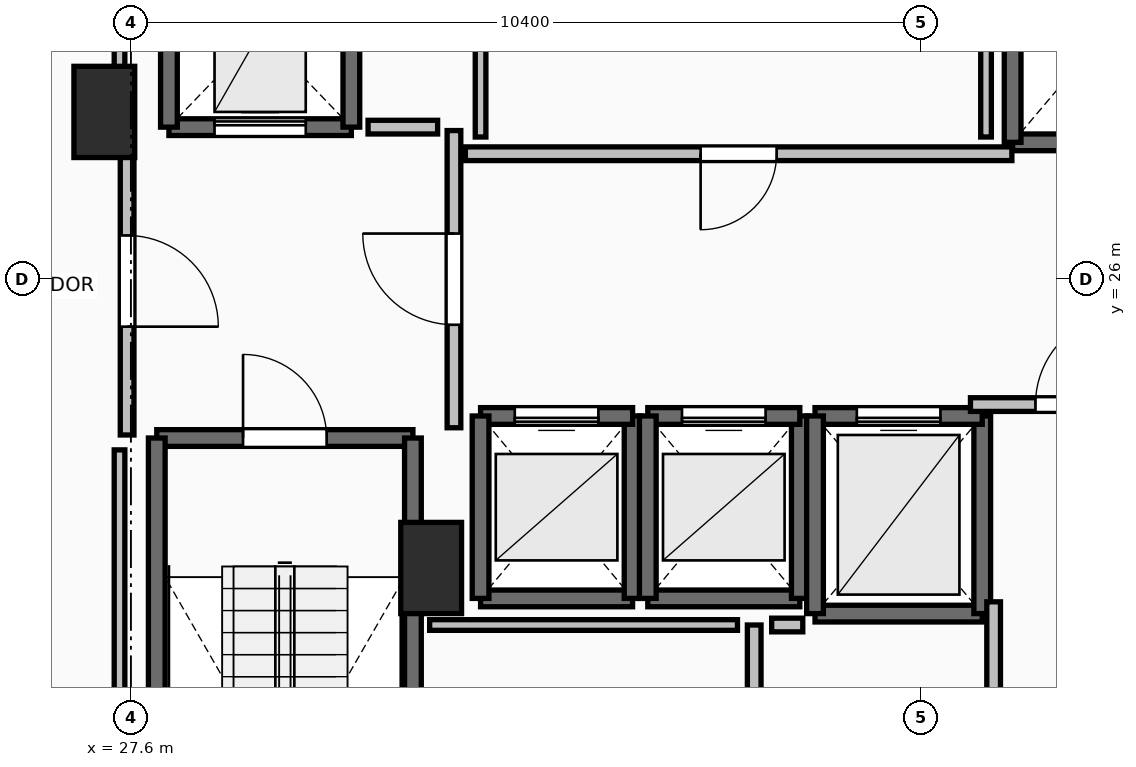
"""IFC4 building model, lengths in metres.
Left out: names, types, materials, properties, quantities, classifications, styles, units other than length and angle.
Written with IfcOpenShell. Run it as: python <this file> out.ifc"""

import sys

from ifc_helpers import new_model, si_unit, direction, frame, frame_2d, origin, origin_2d, place, context, subcontext, project, spatial, rectangle, extrude, element, fill, save


model = new_model("IFC4")
c1 = context("Model", 3, precision=1e-05, world=origin(), true_north=direction((0.0, 1.0)))
c2 = subcontext(c1, "Body", "Model", "MODEL_VIEW")
j1 = project(units=[si_unit("LENGTHUNIT", "METRE"), si_unit("PLANEANGLEUNIT", "RADIAN")], contexts=[c1])
p1 = place(None, origin())
s1 = spatial("IfcSite", under=j1, at=p1, CompositionType="ELEMENT")
p2 = place(p1, origin())
s2 = spatial("IfcBuilding", under=s1, at=p2, CompositionType="ELEMENT")
p3 = place(p2, frame((0.0, 0.0, 139.6)))
s3 = spatial("IfcBuildingStorey", under=s2, at=p3, CompositionType="ELEMENT", Elevation=139.6)
for number, where, z_axis, x_axis in (
    (1, (27.25, 28.2, 0.0), (0.0, 0.0, 1.0), (1.0, 0.0, 0.0)),
    (2, (31.55, 22.2, 0.0), (0.0, 0.0, 1.0), (1.0, 0.0, 0.0)),
):
    element("IfcColumn", number, at=place(p3, frame(where, z_axis=z_axis, x_axis=x_axis)), inside=s3, PredefinedType="PILASTER", context=c2, shape_type="SweptSolid", body=[
        extrude(rectangle(XDim=0.8, YDim=1.2, at=origin_2d()), origin(), (0.0, 0.0, 1.0), 3.5),
    ])
p4 = place(p3, frame((27.94, 23.91, 0.0), z_axis=(0.0, 0.0, 1.0), x_axis=(1.0, 0.0, 0.0)))
e3 = element("IfcWall", 3, at=p4, inside=s3, PredefinedType="SOLIDWALL", context=c2, shape_type="SweptSolid", body=[
    extrude(rectangle(XDim=3.37, YDim=0.22, at=frame_2d((1.685, 0.0))), origin(), (0.0, 0.0, 1.0), 3.24),
])
p5 = place(p4, frame((1.135, 0.0, 0.0)))
e4 = element("IfcOpeningElement", 4, at=p5, cuts=e3, PredefinedType="OPENING", context=c2, shape_type="SweptSolid", body=[
    extrude(rectangle(XDim=1.1, YDim=2.15, at=frame_2d((0.55, 1.075))), frame((0.0, 0.125, 0.0), z_axis=(0.0, -1.0, 0.0), x_axis=(1.0, 0.0, 0.0)), (0.0, 0.0, 1.0), 0.25),
])
for number, where, z_axis, x_axis in (
    (5, (31.31, 23.91, 0.0), (0.0, 0.0, 1.0), (0.0, -1.0, 0.0)),
    (6, (27.94, 16.49, 0.0), (0.0, 0.0, 1.0), (0.0, 1.0, 0.0)),
):
    element("IfcWall", number, at=place(p3, frame(where, z_axis=z_axis, x_axis=x_axis)), inside=s3, PredefinedType="SOLIDWALL", context=c2, shape_type="SweptSolid", body=[
        extrude(rectangle(XDim=7.42, YDim=0.22, at=frame_2d((3.71, 0.0))), origin(), (0.0, 0.0, 1.0), 3.24),
    ])
p6 = place(p3, frame((32.2, 21.8, 0.0), z_axis=(0.0, 0.0, 1.0), x_axis=(1.0, 0.0, 0.0)))
e7 = element("IfcWall", 7, at=p6, inside=s3, PredefinedType="SOLIDWALL", context=c2, shape_type="SweptSolid", body=[
    extrude(rectangle(XDim=2.0, YDim=0.22, at=frame_2d((1.0, 0.0))), origin(), (0.0, 0.0, 1.0), 3.24),
])
p7 = place(p3, frame((34.2, 21.8, 0.0), z_axis=(0.0, 0.0, 1.0), x_axis=(0.0, 1.0, 0.0)))
e8 = element("IfcWall", 8, at=p7, inside=s3, PredefinedType="SOLIDWALL", context=c2, shape_type="SweptSolid", body=[
    extrude(rectangle(XDim=2.4, YDim=0.22, at=frame_2d((1.2, 0.0))), origin(), (0.0, 0.0, 1.0), 3.24),
])
p8 = place(p3, frame((34.2, 24.2, 0.0), z_axis=(0.0, 0.0, 1.0), x_axis=(-1.0, 0.0, 0.0)))
e9 = element("IfcWall", 9, at=p8, inside=s3, PredefinedType="SOLIDWALL", context=c2, shape_type="SweptSolid", body=[
    extrude(rectangle(XDim=2.0, YDim=0.22, at=frame_2d((1.0, 0.0))), origin(), (0.0, 0.0, 1.0), 3.24),
])
p9 = place(p8, frame((0.45, 0.0, 0.0)))
e10 = element("IfcOpeningElement", 10, at=p9, cuts=e9, PredefinedType="OPENING", context=c2, shape_type="SweptSolid", body=[
    extrude(rectangle(XDim=1.1, YDim=2.2, at=frame_2d((0.55, 1.1))), frame((0.0, 0.125, 0.0), z_axis=(0.0, -1.0, 0.0), x_axis=(1.0, 0.0, 0.0)), (0.0, 0.0, 1.0), 0.25),
])
p10 = place(p3, frame((32.2, 24.2, 0.0), z_axis=(0.0, 0.0, 1.0), x_axis=(0.0, -1.0, 0.0)))
e11 = element("IfcWall", 11, at=p10, inside=s3, PredefinedType="SOLIDWALL", context=c2, shape_type="SweptSolid", body=[
    extrude(rectangle(XDim=2.4, YDim=0.22, at=frame_2d((1.2, 0.0))), origin(), (0.0, 0.0, 1.0), 3.24),
])
p11 = place(p3, frame((34.4, 21.8, 0.0), z_axis=(0.0, 0.0, 1.0), x_axis=(1.0, 0.0, 0.0)))
e12 = element("IfcWall", 12, at=p11, inside=s3, PredefinedType="SOLIDWALL", context=c2, shape_type="SweptSolid", body=[
    extrude(rectangle(XDim=2.0, YDim=0.22, at=frame_2d((1.0, 0.0))), origin(), (0.0, 0.0, 1.0), 3.24),
])
p12 = place(p3, frame((36.4, 21.8, 0.0), z_axis=(0.0, 0.0, 1.0), x_axis=(0.0, 1.0, 0.0)))
e13 = element("IfcWall", 13, at=p12, inside=s3, PredefinedType="SOLIDWALL", context=c2, shape_type="SweptSolid", body=[
    extrude(rectangle(XDim=2.4, YDim=0.22, at=frame_2d((1.2, 0.0))), origin(), (0.0, 0.0, 1.0), 3.24),
])
p13 = place(p3, frame((36.4, 24.2, 0.0), z_axis=(0.0, 0.0, 1.0), x_axis=(-1.0, 0.0, 0.0)))
e14 = element("IfcWall", 14, at=p13, inside=s3, PredefinedType="SOLIDWALL", context=c2, shape_type="SweptSolid", body=[
    extrude(rectangle(XDim=2.0, YDim=0.22, at=frame_2d((1.0, 0.0))), origin(), (0.0, 0.0, 1.0), 3.24),
])
p14 = place(p13, frame((0.45, 0.0, 0.0)))
e15 = element("IfcOpeningElement", 15, at=p14, cuts=e14, PredefinedType="OPENING", context=c2, shape_type="SweptSolid", body=[
    extrude(rectangle(XDim=1.1, YDim=2.2, at=frame_2d((0.55, 1.1))), frame((0.0, 0.125, 0.0), z_axis=(0.0, -1.0, 0.0), x_axis=(1.0, 0.0, 0.0)), (0.0, 0.0, 1.0), 0.25),
])
p15 = place(p3, frame((34.4, 24.2, 0.0), z_axis=(0.0, 0.0, 1.0), x_axis=(0.0, -1.0, 0.0)))
e16 = element("IfcWall", 16, at=p15, inside=s3, PredefinedType="SOLIDWALL", context=c2, shape_type="SweptSolid", body=[
    extrude(rectangle(XDim=2.4, YDim=0.22, at=frame_2d((1.2, 0.0))), origin(), (0.0, 0.0, 1.0), 3.24),
])
p16 = place(p3, frame((36.6, 21.6, 0.0), z_axis=(0.0, 0.0, 1.0), x_axis=(1.0, 0.0, 0.0)))
e17 = element("IfcWall", 17, at=p16, inside=s3, PredefinedType="SOLIDWALL", context=c2, shape_type="SweptSolid", body=[
    extrude(rectangle(XDim=2.2, YDim=0.22, at=frame_2d((1.1, 0.0))), origin(), (0.0, 0.0, 1.0), 3.24),
])
p17 = place(p3, frame((38.8, 21.6, 0.0), z_axis=(0.0, 0.0, 1.0), x_axis=(0.0, 1.0, 0.0)))
e18 = element("IfcWall", 18, at=p17, inside=s3, PredefinedType="SOLIDWALL", context=c2, shape_type="SweptSolid", body=[
    extrude(rectangle(XDim=2.6, YDim=0.22, at=frame_2d((1.3, 0.0))), origin(), (0.0, 0.0, 1.0), 3.24),
])
p18 = place(p3, frame((38.8, 24.2, 0.0), z_axis=(0.0, 0.0, 1.0), x_axis=(-1.0, 0.0, 0.0)))
e19 = element("IfcWall", 19, at=p18, inside=s3, PredefinedType="SOLIDWALL", context=c2, shape_type="SweptSolid", body=[
    extrude(rectangle(XDim=2.2, YDim=0.22, at=frame_2d((1.1, 0.0))), origin(), (0.0, 0.0, 1.0), 3.24),
])
p19 = place(p18, frame((0.55, 0.0, 0.0)))
e20 = element("IfcOpeningElement", 20, at=p19, cuts=e19, PredefinedType="OPENING", context=c2, shape_type="SweptSolid", body=[
    extrude(rectangle(XDim=1.1, YDim=2.2, at=frame_2d((0.55, 1.1))), frame((0.0, 0.125, 0.0), z_axis=(0.0, -1.0, 0.0), x_axis=(1.0, 0.0, 0.0)), (0.0, 0.0, 1.0), 0.25),
])
p20 = place(p3, frame((36.6, 24.2, 0.0), z_axis=(0.0, 0.0, 1.0), x_axis=(0.0, -1.0, 0.0)))
e21 = element("IfcWall", 21, at=p20, inside=s3, PredefinedType="SOLIDWALL", context=c2, shape_type="SweptSolid", body=[
    extrude(rectangle(XDim=2.6, YDim=0.22, at=frame_2d((1.3, 0.0))), origin(), (0.0, 0.0, 1.0), 3.24),
])
p21 = place(p3, frame((39.2, 27.8, 0.0), z_axis=(0.0, 0.0, 1.0), x_axis=(1.0, 0.0, 0.0)))
e22 = element("IfcWall", 22, at=p21, inside=s3, PredefinedType="SOLIDWALL", context=c2, shape_type="SweptSolid", body=[
    extrude(rectangle(XDim=2.2, YDim=0.22, at=frame_2d((1.1, 0.0))), origin(), (0.0, 0.0, 1.0), 3.24),
])
p22 = place(p3, frame((39.2, 30.4, 0.0), z_axis=(0.0, 0.0, 1.0), x_axis=(0.0, -1.0, 0.0)))
e23 = element("IfcWall", 23, at=p22, inside=s3, PredefinedType="SOLIDWALL", context=c2, shape_type="SweptSolid", body=[
    extrude(rectangle(XDim=2.6, YDim=0.22, at=frame_2d((1.3, 0.0))), origin(), (0.0, 0.0, 1.0), 3.24),
])
p23 = place(p3, frame((28.1, 28.0, 0.0), z_axis=(0.0, 0.0, 1.0), x_axis=(1.0, 0.0, 0.0)))
e24 = element("IfcWall", 24, at=p23, inside=s3, PredefinedType="SHEAR", context=c2, shape_type="SweptSolid", body=[
    extrude(rectangle(XDim=2.4, YDim=0.22, at=frame_2d((1.2, 0.0))), origin(), (0.0, 0.0, 1.0), 3.24),
])
p24 = place(p23, frame((0.6, 0.0, 0.0)))
e25 = element("IfcOpeningElement", 25, at=p24, cuts=e24, PredefinedType="OPENING", context=c2, shape_type="SweptSolid", body=[
    extrude(rectangle(XDim=1.2, YDim=2.2, at=frame_2d((0.6, 1.1))), frame((0.0, 0.125, 0.0), z_axis=(0.0, -1.0, 0.0), x_axis=(1.0, 0.0, 0.0)), (0.0, 0.0, 1.0), 0.25),
])
for number, where, z_axis, x_axis in (
    (26, (30.5, 28.0, 0.0), (0.0, 0.0, 1.0), (0.0, 1.0, 0.0)),
    (27, (28.1, 30.5, 0.0), (0.0, 0.0, 1.0), (0.0, -1.0, 0.0)),
):
    element("IfcWall", number, at=place(p3, frame(where, z_axis=z_axis, x_axis=x_axis)), inside=s3, PredefinedType="SHEAR", context=c2, shape_type="SweptSolid", body=[
        extrude(rectangle(XDim=2.5, YDim=0.22, at=frame_2d((1.25, 0.0))), origin(), (0.0, 0.0, 1.0), 3.24),
    ])
p25 = place(p3, frame((31.85, 24.045, 0.0), z_axis=(0.0, 0.0, 1.0), x_axis=(0.0, 1.0, 0.0)))
e28 = element("IfcWall", 28, at=p25, inside=s3, PredefinedType="PARTITIONING", context=c2, shape_type="SweptSolid", body=[
    extrude(rectangle(XDim=3.91, YDim=0.18, at=frame_2d((1.955, 0.0))), origin(), (0.0, 0.0, 1.0), 3.24),
])
p26 = place(p25, frame((1.355, 0.0, 0.0)))
e29 = element("IfcOpeningElement", 29, at=p26, cuts=e28, PredefinedType="OPENING", context=c2, shape_type="SweptSolid", body=[
    extrude(rectangle(XDim=1.2, YDim=2.15, at=frame_2d((0.6, 1.075))), frame((0.0, 0.105, 0.0), z_axis=(0.0, -1.0, 0.0), x_axis=(1.0, 0.0, 0.0)), (0.0, 0.0, 1.0), 0.21),
])
p27 = place(p3, frame((27.55, 28.0, 0.0), z_axis=(0.0, 0.0, 1.0), x_axis=(0.0, -1.0, 0.0)))
e30 = element("IfcWall", 30, at=p27, inside=s3, PredefinedType="PARTITIONING", context=c2, shape_type="SweptSolid", body=[
    extrude(rectangle(XDim=4.05, YDim=0.18, at=frame_2d((2.025, 0.0))), origin(), (0.0, 0.0, 1.0), 3.24),
])
p28 = place(p27, frame((1.425, 0.0, 0.0)))
e31 = element("IfcOpeningElement", 31, at=p28, cuts=e30, PredefinedType="OPENING", context=c2, shape_type="SweptSolid", body=[
    extrude(rectangle(XDim=1.2, YDim=2.15, at=frame_2d((0.6, 1.075))), frame((0.0, 0.105, 0.0), z_axis=(0.0, -1.0, 0.0), x_axis=(1.0, 0.0, 0.0)), (0.0, 0.0, 1.0), 0.21),
])
p29 = place(p3, frame((38.645, 24.35, 0.0), z_axis=(0.0, 0.0, 1.0), x_axis=(1.0, 0.0, 0.0)))
e32 = element("IfcWall", 32, at=p29, inside=s3, PredefinedType="PARTITIONING", context=c2, shape_type="SweptSolid", body=[
    extrude(rectangle(XDim=2.91, YDim=0.18, at=frame_2d((1.455, 0.0))), origin(), (0.0, 0.0, 1.0), 3.24),
])
p30 = place(p29, frame((0.855, 0.0, 0.0)))
e33 = element("IfcOpeningElement", 33, at=p30, cuts=e32, PredefinedType="OPENING", context=c2, shape_type="SweptSolid", body=[
    extrude(rectangle(XDim=1.2, YDim=2.15, at=frame_2d((0.6, 1.075))), frame((0.0, 0.105, 0.0), z_axis=(0.0, -1.0, 0.0), x_axis=(1.0, 0.0, 0.0)), (0.0, 0.0, 1.0), 0.21),
])
p31 = place(p3, frame((39.19, 27.65, 0.0), z_axis=(0.0, 0.0, 1.0), x_axis=(-1.0, 0.0, 0.0)))
e34 = element("IfcWall", 34, at=p31, inside=s3, PredefinedType="PARTITIONING", context=c2, shape_type="SweptSolid", body=[
    extrude(rectangle(XDim=7.19, YDim=0.18, at=frame_2d((3.595, 0.0))), origin(), (0.0, 0.0, 1.0), 3.24),
])
p32 = place(p31, frame((3.095, 0.0, 0.0)))
e35 = element("IfcOpeningElement", 35, at=p32, cuts=e34, PredefinedType="OPENING", context=c2, shape_type="SweptSolid", body=[
    extrude(rectangle(XDim=1.0, YDim=2.15, at=frame_2d((0.5, 1.075))), frame((0.0, 0.105, 0.0), z_axis=(0.0, -1.0, 0.0), x_axis=(1.0, 0.0, 0.0)), (0.0, 0.0, 1.0), 0.21),
])
p33 = place(p3, frame((38.95, 21.755, 0.0), z_axis=(0.0, 0.0, 1.0), x_axis=(0.0, -1.0, 0.0)))
e36 = element("IfcWall", 36, at=p33, inside=s3, PredefinedType="PARTITIONING", context=c2, shape_type="SweptSolid", body=[
    extrude(rectangle(XDim=5.435, YDim=0.18, at=frame_2d((2.717, 0.0))), origin(), (0.0, 0.0, 1.0), 3.24),
])
p34 = place(p33, frame((2.018, 0.0, 0.0)))
e37 = element("IfcOpeningElement", 37, at=p34, cuts=e36, PredefinedType="OPENING", context=c2, shape_type="SweptSolid", body=[
    extrude(rectangle(XDim=1.4, YDim=2.2, at=frame_2d((0.7, 1.1))), frame((0.0, 0.105, 0.0), z_axis=(0.0, -1.0, 0.0), x_axis=(1.0, 0.0, 0.0)), (0.0, 0.0, 1.0), 0.21),
])
p35 = place(p3, frame((35.8, 16.32, 0.0), z_axis=(0.0, 0.0, 1.0), x_axis=(0.0, 1.0, 0.0)))
e38 = element("IfcWall", 38, at=p35, inside=s3, PredefinedType="PARTITIONING", context=c2, shape_type="SweptSolid", body=[
    extrude(rectangle(XDim=5.13, YDim=0.18, at=frame_2d((2.565, 0.0))), origin(), (0.0, 0.0, 1.0), 3.24),
])
p36 = place(p3, frame((31.635, 28.0, 0.0), z_axis=(0.0, 0.0, 1.0), x_axis=(-1.0, 0.0, 0.0)))
e39 = element("IfcWall", 39, at=p36, inside=s3, PredefinedType="PARTITIONING", context=c2, shape_type="SweptSolid", body=[
    extrude(rectangle(XDim=0.915, YDim=0.18, at=frame_2d((0.458, 0.0))), origin(), (0.0, 0.0, 1.0), 3.24),
])
p37 = place(p3, frame((35.58, 21.45, 0.0), z_axis=(0.0, 0.0, 1.0), x_axis=(-1.0, 0.0, 0.0)))
e40 = element("IfcWall", 40, at=p37, inside=s3, PredefinedType="PARTITIONING", context=c2, shape_type="SweptSolid", body=[
    extrude(rectangle(XDim=4.05, YDim=0.14, at=frame_2d((2.025, 0.0))), origin(), (0.0, 0.0, 1.0), 3.24),
])
p38 = place(p3, frame((36.439, 21.45, 0.0), z_axis=(0.0, 0.0, 1.0), x_axis=(-1.0, 0.0, 0.0)))
e41 = element("IfcWall", 41, at=p38, inside=s3, PredefinedType="PARTITIONING", context=c2, shape_type="SweptSolid", body=[
    extrude(rectangle(XDim=0.409, YDim=0.18, at=frame_2d((0.205, 0.0))), origin(), (0.0, 0.0, 1.0), 3.24),
])
for number, where, z_axis, x_axis in (
    (42, (32.2, 30.26, 0.0), (0.0, 0.0, 1.0), (0.0, -1.0, 0.0)),
    (43, (38.85, 27.87, 0.0), (0.0, 0.0, 1.0), (0.0, 1.0, 0.0)),
):
    element("IfcWall", number, at=place(p3, frame(where, z_axis=z_axis, x_axis=x_axis)), inside=s3, PredefinedType="PARTITIONING", context=c2, shape_type="SweptSolid", body=[
        extrude(rectangle(XDim=2.39, YDim=0.14, at=frame_2d((1.195, 0.0))), origin(), (0.0, 0.0, 1.0), 3.24),
    ])
p39 = place(p3, frame((27.45, 33.45, 0.0), z_axis=(0.0, 0.0, 1.0), x_axis=(0.0, -1.0, 0.0)))
e44 = element("IfcWall", 44, at=p39, inside=s3, PredefinedType="PARTITIONING", context=c2, shape_type="SweptSolid", body=[
    extrude(rectangle(XDim=5.254, YDim=0.14, at=frame_2d((2.627, 0.0))), origin(), (0.0, 0.0, 1.0), 2.432),
])
p40 = place(p3, frame((27.45, 23.754, 0.0), z_axis=(0.0, 0.0, 1.0), x_axis=(0.0, -1.0, 0.0)))
e45 = element("IfcWall", 45, at=p40, inside=s3, PredefinedType="PARTITIONING", context=c2, shape_type="SweptSolid", body=[
    extrude(rectangle(XDim=7.514, YDim=0.14, at=frame_2d((3.757, 0.0))), origin(), (0.0, 0.0, 1.0), 2.432),
])
p41 = place(p5, origin())
e46 = element("IfcDoor", 46, at=p41, inside=s3, OperationType="SINGLE_SWING_LEFT", PredefinedType="DOOR", context=c2, shape_type="SweptSolid", body=[
    extrude(rectangle(XDim=1.1, YDim=2.15, at=frame_2d((0.55, 1.075))), frame((0.0, 0.025, 0.0), z_axis=(0.0, -1.0, 0.0), x_axis=(1.0, 0.0, 0.0)), (0.0, 0.0, 1.0), 0.05),
])
fill(e4, e46)
p42 = place(p9, origin())
e47 = element("IfcDoor", 47, at=p42, inside=s3, OperationType="SLIDING_TO_LEFT", PredefinedType="DOOR", context=c2, shape_type="SweptSolid", body=[
    extrude(rectangle(XDim=1.1, YDim=2.2, at=frame_2d((0.55, 1.1))), frame((0.0, 0.025, 0.0), z_axis=(0.0, -1.0, 0.0), x_axis=(1.0, 0.0, 0.0)), (0.0, 0.0, 1.0), 0.05),
])
fill(e10, e47)
p43 = place(p14, origin())
e48 = element("IfcDoor", 48, at=p43, inside=s3, OperationType="SLIDING_TO_LEFT", PredefinedType="DOOR", context=c2, shape_type="SweptSolid", body=[
    extrude(rectangle(XDim=1.1, YDim=2.2, at=frame_2d((0.55, 1.1))), frame((0.0, 0.025, 0.0), z_axis=(0.0, -1.0, 0.0), x_axis=(1.0, 0.0, 0.0)), (0.0, 0.0, 1.0), 0.05),
])
fill(e15, e48)
p44 = place(p19, origin())
e49 = element("IfcDoor", 49, at=p44, inside=s3, OperationType="SLIDING_TO_LEFT", PredefinedType="DOOR", context=c2, shape_type="SweptSolid", body=[
    extrude(rectangle(XDim=1.1, YDim=2.2, at=frame_2d((0.55, 1.1))), frame((0.0, 0.025, 0.0), z_axis=(0.0, -1.0, 0.0), x_axis=(1.0, 0.0, 0.0)), (0.0, 0.0, 1.0), 0.05),
])
fill(e20, e49)
p45 = place(p24, origin())
e50 = element("IfcDoor", 50, at=p45, inside=s3, OperationType="SLIDING_TO_LEFT", PredefinedType="DOOR", context=c2, shape_type="SweptSolid", body=[
    extrude(rectangle(XDim=1.2, YDim=2.2, at=frame_2d((0.6, 1.1))), frame((0.0, 0.025, 0.0), z_axis=(0.0, -1.0, 0.0), x_axis=(1.0, 0.0, 0.0)), (0.0, 0.0, 1.0), 0.05),
])
fill(e25, e50)
p46 = place(p26, origin())
e51 = element("IfcDoor", 51, at=p46, inside=s3, OperationType="SINGLE_SWING_RIGHT", PredefinedType="DOOR", context=c2, shape_type="SweptSolid", body=[
    extrude(rectangle(XDim=1.2, YDim=2.15, at=frame_2d((0.6, 1.075))), frame((0.0, 0.025, 0.0), z_axis=(0.0, -1.0, 0.0), x_axis=(1.0, 0.0, 0.0)), (0.0, 0.0, 1.0), 0.05),
])
fill(e29, e51)
p47 = place(p28, origin())
e52 = element("IfcDoor", 52, at=p47, inside=s3, OperationType="SINGLE_SWING_RIGHT", PredefinedType="DOOR", context=c2, shape_type="SweptSolid", body=[
    extrude(rectangle(XDim=1.2, YDim=2.15, at=frame_2d((0.6, 1.075))), frame((0.0, 0.025, 0.0), z_axis=(0.0, -1.0, 0.0), x_axis=(1.0, 0.0, 0.0)), (0.0, 0.0, 1.0), 0.05),
])
fill(e31, e52)
p48 = place(p30, origin())
e53 = element("IfcDoor", 53, at=p48, inside=s3, OperationType="SINGLE_SWING_RIGHT", PredefinedType="DOOR", context=c2, shape_type="SweptSolid", body=[
    extrude(rectangle(XDim=1.2, YDim=2.15, at=frame_2d((0.6, 1.075))), frame((0.0, 0.025, 0.0), z_axis=(0.0, -1.0, 0.0), x_axis=(1.0, 0.0, 0.0)), (0.0, 0.0, 1.0), 0.05),
])
fill(e33, e53)
p49 = place(p32, origin())
e54 = element("IfcDoor", 54, at=p49, inside=s3, OperationType="SINGLE_SWING_RIGHT", PredefinedType="DOOR", context=c2, shape_type="SweptSolid", body=[
    extrude(rectangle(XDim=1.0, YDim=2.15, at=frame_2d((0.5, 1.075))), frame((0.0, 0.025, 0.0), z_axis=(0.0, -1.0, 0.0), x_axis=(1.0, 0.0, 0.0)), (0.0, 0.0, 1.0), 0.05),
])
fill(e35, e54)
save(model, sys.argv[1])
